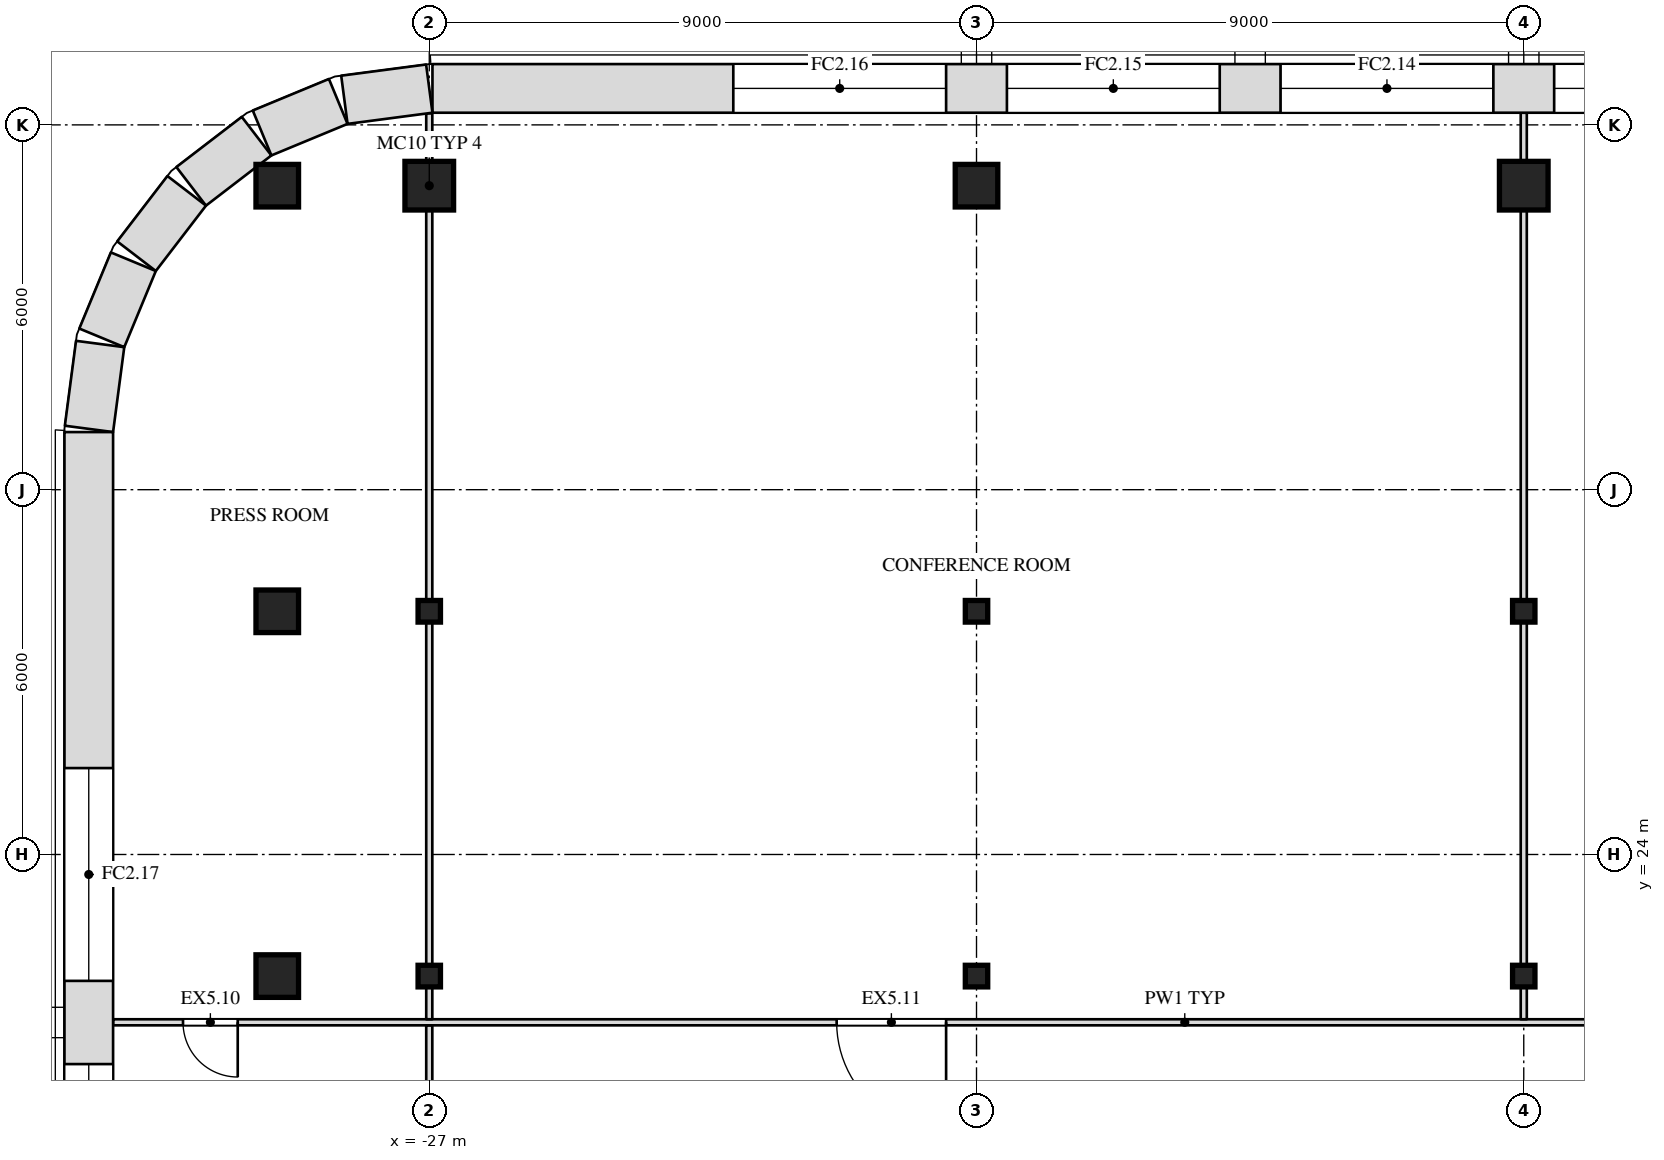
"""IFC4 building model, lengths in metres.
Left out: names, types, materials, properties, quantities, classifications, styles, units other than length and angle.
Written with IfcOpenShell. Run it as: python <this file> out.ifc"""

import sys

from ifc_helpers import new_model, si_unit, direction, frame, frame_2d, origin, origin_2d, place, context, subcontext, project, spatial, rectangle, i_section, extrude, element, fill, save


model = new_model("IFC4")
c1 = context("Model", 3, precision=1e-05, world=origin(), true_north=direction((0.0, 1.0)))
c2 = subcontext(c1, "Body", "Model", "MODEL_VIEW")
j1 = project(units=[si_unit("LENGTHUNIT", "METRE"), si_unit("PLANEANGLEUNIT", "RADIAN")], contexts=[c1])
p1 = place(None, origin())
s1 = spatial("IfcSite", under=j1, at=p1, CompositionType="ELEMENT")
p2 = place(p1, origin())
s2 = spatial("IfcBuilding", under=s1, at=p2, CompositionType="ELEMENT")
p3 = place(p2, frame((0.0, 0.0, 288.5)))
s3 = spatial("IfcBuildingStorey", under=s2, at=p3, CompositionType="ELEMENT", Elevation=288.5)
p4 = place(p3, frame((-29.5, 22.0, 0.0), z_axis=(0.0, 0.0, 1.0), x_axis=(1.0, 0.0, 0.0)))
e1 = element("IfcColumn", 1, at=p4, inside=s3, PredefinedType="COLUMN", context=c2, shape_type="SweptSolid", body=[
    extrude(rectangle(XDim=0.7, YDim=0.7, at=origin_2d()), origin(), (0.0, 0.0, 1.0), 4.0),
])
for number, where, z_axis, x_axis in (
    (2, (-27.0, 22.0, 0.0), (0.0, 0.0, 1.0), (1.0, 0.0, 0.0)),
    (3, (-18.0, 22.0, 0.0), (0.0, 0.0, 1.0), (1.0, 0.0, 0.0)),
    (4, (-9.0, 22.0, 0.0), (0.0, 0.0, 1.0), (1.0, 0.0, 0.0)),
):
    element("IfcColumn", number, at=place(p3, frame(where, z_axis=z_axis, x_axis=x_axis)), inside=s3, PredefinedType="COLUMN", context=c2, shape_type="SweptSolid", body=[
        extrude(i_section(OverallWidth=0.368, OverallDepth=0.356, WebThickness=0.011, FlangeThickness=0.018, at=origin_2d()), origin(), (0.0, 0.0, 1.0), 4.0),
    ])
p5 = place(p3, frame((-29.5, 28.0, 0.0), z_axis=(0.0, 0.0, 1.0), x_axis=(1.0, 0.0, 0.0)))
e5 = element("IfcColumn", 5, at=p5, inside=s3, PredefinedType="COLUMN", context=c2, shape_type="SweptSolid", body=[
    extrude(rectangle(XDim=0.7, YDim=0.7, at=origin_2d()), origin(), (0.0, 0.0, 1.0), 4.0),
])
for number, where, z_axis, x_axis in (
    (6, (-27.0, 28.0, 0.0), (0.0, 0.0, 1.0), (1.0, 0.0, 0.0)),
    (7, (-18.0, 28.0, 0.0), (0.0, 0.0, 1.0), (1.0, 0.0, 0.0)),
    (8, (-9.0, 28.0, 0.0), (0.0, 0.0, 1.0), (1.0, 0.0, 0.0)),
):
    element("IfcColumn", number, at=place(p3, frame(where, z_axis=z_axis, x_axis=x_axis)), inside=s3, PredefinedType="COLUMN", context=c2, shape_type="SweptSolid", body=[
        extrude(i_section(OverallWidth=0.368, OverallDepth=0.356, WebThickness=0.011, FlangeThickness=0.018, at=origin_2d()), origin(), (0.0, 0.0, 1.0), 4.0),
    ])
p6 = place(p3, frame((-29.5, 35.0, 0.0), z_axis=(0.0, 0.0, 1.0), x_axis=(1.0, 0.0, 0.0)))
e9 = element("IfcColumn", 9, at=p6, inside=s3, PredefinedType="COLUMN", context=c2, shape_type="SweptSolid", body=[
    extrude(rectangle(XDim=0.7, YDim=0.7, at=origin_2d()), origin(), (0.0, 0.0, 1.0), 4.0),
])
p7 = place(p3, frame((-27.0, 35.0, 0.0), z_axis=(0.0, 0.0, 1.0), x_axis=(1.0, 0.0, 0.0)))
e10 = element("IfcColumn", 10, at=p7, inside=s3, PredefinedType="COLUMN", context=c2, shape_type="SweptSolid", body=[
    extrude(rectangle(XDim=0.8, YDim=0.8, at=origin_2d()), origin(), (0.0, 0.0, 1.0), 4.0),
])
p8 = place(p3, frame((-18.0, 35.0, 0.0), z_axis=(0.0, 0.0, 1.0), x_axis=(1.0, 0.0, 0.0)))
e11 = element("IfcColumn", 11, at=p8, inside=s3, PredefinedType="COLUMN", context=c2, shape_type="SweptSolid", body=[
    extrude(rectangle(XDim=0.7, YDim=0.7, at=origin_2d()), origin(), (0.0, 0.0, 1.0), 4.0),
])
p9 = place(p3, frame((-9.0, 35.0, 0.0), z_axis=(0.0, 0.0, 1.0), x_axis=(1.0, 0.0, 0.0)))
e12 = element("IfcColumn", 12, at=p9, inside=s3, PredefinedType="COLUMN", context=c2, shape_type="SweptSolid", body=[
    extrude(rectangle(XDim=0.8, YDim=0.8, at=origin_2d()), origin(), (0.0, 0.0, 1.0), 4.0),
])
p10 = place(p3, frame((-27.0, 14.178, 0.0), z_axis=(0.0, 0.0, 1.0), x_axis=(0.0, 1.0, 0.0)))
e13 = element("IfcWall", 13, at=p10, inside=s3, PredefinedType="PARTITIONING", context=c2, shape_type="SweptSolid", body=[
    extrude(rectangle(XDim=7.012, YDim=0.1, at=frame_2d((3.506, 0.0))), origin(), (0.0, 0.0, 1.0), 3.247),
])
p11 = place(p3, frame((-32.2, 21.24, 0.0), z_axis=(0.0, 0.0, 1.0), x_axis=(1.0, 0.0, 0.0)))
e14 = element("IfcWall", 14, at=p11, inside=s3, PredefinedType="PARTITIONING", context=c2, shape_type="SweptSolid", body=[
    extrude(rectangle(XDim=35.25, YDim=0.1, at=frame_2d((17.625, 0.0))), origin(), (0.0, 0.0, 1.0), 3.78),
])
p12 = place(p11, frame((1.15, 0.0, 0.0)))
e15 = element("IfcOpeningElement", 15, at=p12, cuts=e14, PredefinedType="OPENING", context=c2, shape_type="SweptSolid", body=[
    extrude(rectangle(XDim=0.9, YDim=2.1, at=frame_2d((0.45, 1.05))), frame((0.0, 0.062, 0.0), z_axis=(0.0, -1.0, 0.0), x_axis=(1.0, 0.0, 0.0)), (0.0, 0.0, 1.0), 0.124),
])
p13 = place(p11, frame((11.9, 0.0, 0.0)))
e16 = element("IfcOpeningElement", 16, at=p13, cuts=e14, PredefinedType="OPENING", context=c2, shape_type="SweptSolid", body=[
    extrude(rectangle(XDim=1.8, YDim=2.1, at=frame_2d((0.9, 1.05))), frame((0.0, 0.062, 0.0), z_axis=(0.0, -1.0, 0.0), x_axis=(1.0, 0.0, 0.0)), (0.0, 0.0, 1.0), 0.124),
])
p14 = place(p3, frame((-27.0, 21.29, 0.0), z_axis=(0.0, 0.0, 1.0), x_axis=(0.0, 1.0, 0.0)))
e17 = element("IfcWall", 17, at=p14, inside=s3, PredefinedType="PARTITIONING", context=c2, shape_type="SweptSolid", body=[
    extrude(rectangle(XDim=0.532, YDim=0.1, at=frame_2d((0.266, 0.0))), origin(), (0.0, 0.0, 1.0), 3.247),
])
p15 = place(p3, frame((-27.0, 22.178, 0.0), z_axis=(0.0, 0.0, 1.0), x_axis=(0.0, 1.0, 0.0)))
e18 = element("IfcWall", 18, at=p15, inside=s3, PredefinedType="PARTITIONING", context=c2, shape_type="SweptSolid", body=[
    extrude(rectangle(XDim=5.645, YDim=0.1, at=frame_2d((2.822, 0.0))), origin(), (0.0, 0.0, 1.0), 3.247),
])
p16 = place(p3, frame((-27.0, 28.178, 0.0), z_axis=(0.0, 0.0, 1.0), x_axis=(0.0, 1.0, 0.0)))
e19 = element("IfcWall", 19, at=p16, inside=s3, PredefinedType="PARTITIONING", context=c2, shape_type="SweptSolid", body=[
    extrude(rectangle(XDim=6.422, YDim=0.1, at=frame_2d((3.211, 0.0))), origin(), (0.0, 0.0, 1.0), 3.247),
])
p17 = place(p3, frame((-27.0, 35.4, 0.0), z_axis=(0.0, 0.0, 1.0), x_axis=(0.0, 1.0, 0.0)))
e20 = element("IfcWall", 20, at=p17, inside=s3, PredefinedType="PARTITIONING", context=c2, shape_type="SweptSolid", body=[
    extrude(rectangle(XDim=0.79, YDim=0.1, at=frame_2d((0.395, 0.0))), origin(), (0.0, 0.0, 1.0), 3.78),
])
p18 = place(p3, frame((-9.0, 21.29, 0.0), z_axis=(0.0, 0.0, 1.0), x_axis=(0.0, 1.0, 0.0)))
e21 = element("IfcWall", 21, at=p18, inside=s3, PredefinedType="PARTITIONING", context=c2, shape_type="SweptSolid", body=[
    extrude(rectangle(XDim=0.532, YDim=0.1, at=frame_2d((0.266, 0.0))), origin(), (0.0, 0.0, 1.0), 3.247),
])
p19 = place(p3, frame((-9.0, 22.178, 0.0), z_axis=(0.0, 0.0, 1.0), x_axis=(0.0, 1.0, 0.0)))
e22 = element("IfcWall", 22, at=p19, inside=s3, PredefinedType="PARTITIONING", context=c2, shape_type="SweptSolid", body=[
    extrude(rectangle(XDim=5.645, YDim=0.1, at=frame_2d((2.822, 0.0))), origin(), (0.0, 0.0, 1.0), 3.247),
])
p20 = place(p3, frame((-9.0, 28.178, 0.0), z_axis=(0.0, 0.0, 1.0), x_axis=(0.0, 1.0, 0.0)))
e23 = element("IfcWall", 23, at=p20, inside=s3, PredefinedType="PARTITIONING", context=c2, shape_type="SweptSolid", body=[
    extrude(rectangle(XDim=6.422, YDim=0.1, at=frame_2d((3.211, 0.0))), origin(), (0.0, 0.0, 1.0), 3.247),
])
p21 = place(p3, frame((-9.0, 35.4, 0.0), z_axis=(0.0, 0.0, 1.0), x_axis=(0.0, 1.0, 0.0)))
e24 = element("IfcWall", 24, at=p21, inside=s3, PredefinedType="PARTITIONING", context=c2, shape_type="SweptSolid", body=[
    extrude(rectangle(XDim=0.8, YDim=0.1, at=frame_2d((0.4, 0.0))), origin(), (0.0, 0.0, 1.0), 3.78),
])
p22 = place(p3, frame((26.948, 36.6, 0.0), z_axis=(0.0, 0.0, 1.0), x_axis=(-1.0, 0.0, 0.0)))
e25 = element("IfcWall", 25, at=p22, inside=s3, PredefinedType="SOLIDWALL", context=c2, shape_type="SweptSolid", body=[
    extrude(rectangle(XDim=53.895, YDim=0.8, at=frame_2d((26.948, 0.0))), origin(), (0.0, 0.0, 1.0), 3.78),
])
p23 = place(p22, frame((4.948, 0.0, 1.0)))
e26 = element("IfcOpeningElement", 26, at=p23, cuts=e25, PredefinedType="OPENING", context=c2, shape_type="SweptSolid", body=[
    extrude(rectangle(XDim=3.5, YDim=2.5, at=frame_2d((1.75, 1.25))), frame((0.0, 0.412, 0.0), z_axis=(0.0, -1.0, 0.0), x_axis=(1.0, 0.0, 0.0)), (0.0, 0.0, 1.0), 0.824),
])
p24 = place(p22, frame((9.448, 0.0, 1.0)))
e27 = element("IfcOpeningElement", 27, at=p24, cuts=e25, PredefinedType="OPENING", context=c2, shape_type="SweptSolid", body=[
    extrude(rectangle(XDim=3.5, YDim=2.5, at=frame_2d((1.75, 1.25))), frame((0.0, 0.412, 0.0), z_axis=(0.0, -1.0, 0.0), x_axis=(1.0, 0.0, 0.0)), (0.0, 0.0, 1.0), 0.824),
])
p25 = place(p22, frame((13.948, 0.0, 1.0)))
e28 = element("IfcOpeningElement", 28, at=p25, cuts=e25, PredefinedType="OPENING", context=c2, shape_type="SweptSolid", body=[
    extrude(rectangle(XDim=3.5, YDim=2.5, at=frame_2d((1.75, 1.25))), frame((0.0, 0.412, 0.0), z_axis=(0.0, -1.0, 0.0), x_axis=(1.0, 0.0, 0.0)), (0.0, 0.0, 1.0), 0.824),
])
p26 = place(p22, frame((18.448, 0.0, 1.0)))
e29 = element("IfcOpeningElement", 29, at=p26, cuts=e25, PredefinedType="OPENING", context=c2, shape_type="SweptSolid", body=[
    extrude(rectangle(XDim=3.5, YDim=2.5, at=frame_2d((1.75, 1.25))), frame((0.0, 0.412, 0.0), z_axis=(0.0, -1.0, 0.0), x_axis=(1.0, 0.0, 0.0)), (0.0, 0.0, 1.0), 0.824),
])
p27 = place(p22, frame((22.948, 0.0, 1.0)))
e30 = element("IfcOpeningElement", 30, at=p27, cuts=e25, PredefinedType="OPENING", context=c2, shape_type="SweptSolid", body=[
    extrude(rectangle(XDim=3.5, YDim=2.5, at=frame_2d((1.75, 1.25))), frame((0.0, 0.412, 0.0), z_axis=(0.0, -1.0, 0.0), x_axis=(1.0, 0.0, 0.0)), (0.0, 0.0, 1.0), 0.824),
])
p28 = place(p22, frame((27.448, 0.0, 1.0)))
e31 = element("IfcOpeningElement", 31, at=p28, cuts=e25, PredefinedType="OPENING", context=c2, shape_type="SweptSolid", body=[
    extrude(rectangle(XDim=3.5, YDim=2.5, at=frame_2d((1.75, 1.25))), frame((0.0, 0.412, 0.0), z_axis=(0.0, -1.0, 0.0), x_axis=(1.0, 0.0, 0.0)), (0.0, 0.0, 1.0), 0.824),
])
p29 = place(p22, frame((31.948, 0.0, 1.0)))
e32 = element("IfcOpeningElement", 32, at=p29, cuts=e25, PredefinedType="OPENING", context=c2, shape_type="SweptSolid", body=[
    extrude(rectangle(XDim=3.5, YDim=2.5, at=frame_2d((1.75, 1.25))), frame((0.0, 0.412, 0.0), z_axis=(0.0, -1.0, 0.0), x_axis=(1.0, 0.0, 0.0)), (0.0, 0.0, 1.0), 0.824),
])
p30 = place(p22, frame((36.448, 0.0, 1.0)))
e33 = element("IfcOpeningElement", 33, at=p30, cuts=e25, PredefinedType="OPENING", context=c2, shape_type="SweptSolid", body=[
    extrude(rectangle(XDim=3.5, YDim=2.5, at=frame_2d((1.75, 1.25))), frame((0.0, 0.412, 0.0), z_axis=(0.0, -1.0, 0.0), x_axis=(1.0, 0.0, 0.0)), (0.0, 0.0, 1.0), 0.824),
])
p31 = place(p22, frame((40.948, 0.0, 1.0)))
e34 = element("IfcOpeningElement", 34, at=p31, cuts=e25, PredefinedType="OPENING", context=c2, shape_type="SweptSolid", body=[
    extrude(rectangle(XDim=3.5, YDim=2.5, at=frame_2d((1.75, 1.25))), frame((0.0, 0.412, 0.0), z_axis=(0.0, -1.0, 0.0), x_axis=(1.0, 0.0, 0.0)), (0.0, 0.0, 1.0), 0.824),
])
p32 = place(p22, frame((45.448, 0.0, 1.0)))
e35 = element("IfcOpeningElement", 35, at=p32, cuts=e25, PredefinedType="OPENING", context=c2, shape_type="SweptSolid", body=[
    extrude(rectangle(XDim=3.5, YDim=2.5, at=frame_2d((1.75, 1.25))), frame((0.0, 0.412, 0.0), z_axis=(0.0, -1.0, 0.0), x_axis=(1.0, 0.0, 0.0)), (0.0, 0.0, 1.0), 0.824),
])
p33 = place(p3, frame((-27.0, 36.597, 0.0), z_axis=(0.0, 0.0, 1.0), x_axis=(-0.99144603414, -0.130517283865, 0.0)))
e36 = element("IfcWall", 36, at=p33, inside=s3, PredefinedType="SOLIDWALL", context=c2, shape_type="SweptSolid", body=[
    extrude(rectangle(XDim=1.408, YDim=0.8, at=frame_2d((0.704, 0.0))), origin(), (0.0, 0.0, 1.0), 3.78),
])
p34 = place(p3, frame((-28.497, 36.386, 0.0), z_axis=(0.0, 0.0, 1.0), x_axis=(-0.923847774587, -0.38276009378, 0.0)))
e37 = element("IfcWall", 37, at=p34, inside=s3, PredefinedType="SOLIDWALL", context=c2, shape_type="SweptSolid", body=[
    extrude(rectangle(XDim=1.355, YDim=0.8, at=frame_2d((0.678, 0.0))), origin(), (0.0, 0.0, 1.0), 3.78),
])
for number, where, z_axis, x_axis in (
    (38, (-29.84, 35.815, 0.0), (0.0, 0.0, 1.0), (-0.793, -0.609, 0.0)),
    (39, (-30.989, 34.916, 0.0), (0.0, 0.0, 1.0), (-0.609, -0.793, 0.0)),
):
    element("IfcWall", number, at=place(p3, frame(where, z_axis=z_axis, x_axis=x_axis)), inside=s3, PredefinedType="SOLIDWALL", context=c2, shape_type="SweptSolid", body=[
        extrude(rectangle(XDim=1.356, YDim=0.8, at=frame_2d((0.678, 0.0))), origin(), (0.0, 0.0, 1.0), 3.78),
    ])
p35 = place(p3, frame((-31.867, 33.75, 0.0), z_axis=(0.0, 0.0, 1.0), x_axis=(-0.38276009378, -0.923847774587, 0.0)))
e40 = element("IfcWall", 40, at=p35, inside=s3, PredefinedType="SOLIDWALL", context=c2, shape_type="SweptSolid", body=[
    extrude(rectangle(XDim=1.355, YDim=0.8, at=frame_2d((0.678, 0.0))), origin(), (0.0, 0.0, 1.0), 3.78),
])
p36 = place(p3, frame((-32.413, 32.396, 0.0), z_axis=(0.0, 0.0, 1.0), x_axis=(-0.130517283865, -0.99144603414, 0.0)))
e41 = element("IfcWall", 41, at=p36, inside=s3, PredefinedType="SOLIDWALL", context=c2, shape_type="SweptSolid", body=[
    extrude(rectangle(XDim=1.408, YDim=0.8, at=frame_2d((0.704, 0.0))), origin(), (0.0, 0.0, 1.0), 3.78),
])
p37 = place(p3, frame((-32.6, 30.948, 0.0), z_axis=(0.0, 0.0, 1.0), x_axis=(0.0, -1.0, 0.0)))
e42 = element("IfcWall", 42, at=p37, inside=s3, PredefinedType="SOLIDWALL", context=c2, shape_type="SweptSolid", body=[
    extrude(rectangle(XDim=38.895, YDim=0.8, at=frame_2d((19.448, 0.0))), origin(), (0.0, 0.0, 1.0), 3.78),
])
p38 = place(p37, frame((5.526, 0.0, 1.0)))
e43 = element("IfcOpeningElement", 43, at=p38, cuts=e42, PredefinedType="OPENING", context=c2, shape_type="SweptSolid", body=[
    extrude(rectangle(XDim=3.5, YDim=2.5, at=frame_2d((1.75, 1.25))), frame((0.0, 0.412, 0.0), z_axis=(0.0, -1.0, 0.0), x_axis=(1.0, 0.0, 0.0)), (0.0, 0.0, 1.0), 0.824),
])
p39 = place(p37, frame((10.395, 0.0, 1.0)))
e44 = element("IfcOpeningElement", 44, at=p39, cuts=e42, PredefinedType="OPENING", context=c2, shape_type="SweptSolid", body=[
    extrude(rectangle(XDim=3.5, YDim=2.5, at=frame_2d((1.75, 1.25))), frame((0.0, 0.412, 0.0), z_axis=(0.0, -1.0, 0.0), x_axis=(1.0, 0.0, 0.0)), (0.0, 0.0, 1.0), 0.824),
])
p40 = place(p37, frame((15.263, 0.0, 1.0)))
e45 = element("IfcOpeningElement", 45, at=p40, cuts=e42, PredefinedType="OPENING", context=c2, shape_type="SweptSolid", body=[
    extrude(rectangle(XDim=3.5, YDim=2.5, at=frame_2d((1.75, 1.25))), frame((0.0, 0.412, 0.0), z_axis=(0.0, -1.0, 0.0), x_axis=(1.0, 0.0, 0.0)), (0.0, 0.0, 1.0), 0.824),
])
p41 = place(p37, frame((20.132, 0.0, 1.0)))
e46 = element("IfcOpeningElement", 46, at=p41, cuts=e42, PredefinedType="OPENING", context=c2, shape_type="SweptSolid", body=[
    extrude(rectangle(XDim=3.5, YDim=2.5, at=frame_2d((1.75, 1.25))), frame((0.0, 0.412, 0.0), z_axis=(0.0, -1.0, 0.0), x_axis=(1.0, 0.0, 0.0)), (0.0, 0.0, 1.0), 0.824),
])
p42 = place(p37, frame((25.0, 0.0, 1.0)))
e47 = element("IfcOpeningElement", 47, at=p42, cuts=e42, PredefinedType="OPENING", context=c2, shape_type="SweptSolid", body=[
    extrude(rectangle(XDim=3.5, YDim=2.5, at=frame_2d((1.75, 1.25))), frame((0.0, 0.412, 0.0), z_axis=(0.0, -1.0, 0.0), x_axis=(1.0, 0.0, 0.0)), (0.0, 0.0, 1.0), 0.824),
])
p43 = place(p37, frame((29.869, 0.0, 1.0)))
e48 = element("IfcOpeningElement", 48, at=p43, cuts=e42, PredefinedType="OPENING", context=c2, shape_type="SweptSolid", body=[
    extrude(rectangle(XDim=3.5, YDim=2.5, at=frame_2d((1.75, 1.25))), frame((0.0, 0.412, 0.0), z_axis=(0.0, -1.0, 0.0), x_axis=(1.0, 0.0, 0.0)), (0.0, 0.0, 1.0), 0.824),
])
p44 = place(p12, origin())
e49 = element("IfcDoor", 49, at=p44, inside=s3, OperationType="SINGLE_SWING_LEFT", PredefinedType="DOOR", context=c2, shape_type="SweptSolid", body=[
    extrude(rectangle(XDim=0.9, YDim=2.1, at=frame_2d((0.45, 1.05))), frame((0.0, 0.025, 0.0), z_axis=(0.0, -1.0, 0.0), x_axis=(1.0, 0.0, 0.0)), (0.0, 0.0, 1.0), 0.05),
])
fill(e15, e49)
p45 = place(p13, origin())
e50 = element("IfcDoor", 50, at=p45, inside=s3, OperationType="DOUBLE_DOOR_SINGLE_SWING", PredefinedType="DOOR", context=c2, shape_type="SweptSolid", body=[
    extrude(rectangle(XDim=1.8, YDim=2.1, at=frame_2d((0.9, 1.05))), frame((0.0, 0.025, 0.0), z_axis=(0.0, -1.0, 0.0), x_axis=(1.0, 0.0, 0.0)), (0.0, 0.0, 1.0), 0.05),
])
fill(e16, e50)
p46 = place(p29, origin())
e51 = element("IfcWindow", 51, at=p46, inside=s3, PartitioningType="SINGLE_PANEL", PredefinedType="WINDOW", context=c2, shape_type="SweptSolid", body=[
    extrude(rectangle(XDim=3.5, YDim=2.5, at=frame_2d((1.75, 1.25))), frame((0.0, 0.03, 0.0), z_axis=(0.0, -1.0, 0.0), x_axis=(1.0, 0.0, 0.0)), (0.0, 0.0, 1.0), 0.06),
])
fill(e32, e51)
p47 = place(p30, origin())
e52 = element("IfcWindow", 52, at=p47, inside=s3, PartitioningType="SINGLE_PANEL", PredefinedType="WINDOW", context=c2, shape_type="SweptSolid", body=[
    extrude(rectangle(XDim=3.5, YDim=2.5, at=frame_2d((1.75, 1.25))), frame((0.0, 0.03, 0.0), z_axis=(0.0, -1.0, 0.0), x_axis=(1.0, 0.0, 0.0)), (0.0, 0.0, 1.0), 0.06),
])
fill(e33, e52)
p48 = place(p31, origin())
e53 = element("IfcWindow", 53, at=p48, inside=s3, PartitioningType="SINGLE_PANEL", PredefinedType="WINDOW", context=c2, shape_type="SweptSolid", body=[
    extrude(rectangle(XDim=3.5, YDim=2.5, at=frame_2d((1.75, 1.25))), frame((0.0, 0.03, 0.0), z_axis=(0.0, -1.0, 0.0), x_axis=(1.0, 0.0, 0.0)), (0.0, 0.0, 1.0), 0.06),
])
fill(e34, e53)
p49 = place(p32, origin())
e54 = element("IfcWindow", 54, at=p49, inside=s3, PartitioningType="SINGLE_PANEL", PredefinedType="WINDOW", context=c2, shape_type="SweptSolid", body=[
    extrude(rectangle(XDim=3.5, YDim=2.5, at=frame_2d((1.75, 1.25))), frame((0.0, 0.03, 0.0), z_axis=(0.0, -1.0, 0.0), x_axis=(1.0, 0.0, 0.0)), (0.0, 0.0, 1.0), 0.06),
])
fill(e35, e54)
p50 = place(p38, origin())
e55 = element("IfcWindow", 55, at=p50, inside=s3, PartitioningType="SINGLE_PANEL", PredefinedType="WINDOW", context=c2, shape_type="SweptSolid", body=[
    extrude(rectangle(XDim=3.5, YDim=2.5, at=frame_2d((1.75, 1.25))), frame((0.0, 0.03, 0.0), z_axis=(0.0, -1.0, 0.0), x_axis=(1.0, 0.0, 0.0)), (0.0, 0.0, 1.0), 0.06),
])
fill(e43, e55)
p51 = place(p39, origin())
e56 = element("IfcWindow", 56, at=p51, inside=s3, PartitioningType="SINGLE_PANEL", PredefinedType="WINDOW", context=c2, shape_type="SweptSolid", body=[
    extrude(rectangle(XDim=3.5, YDim=2.5, at=frame_2d((1.75, 1.25))), frame((0.0, 0.03, 0.0), z_axis=(0.0, -1.0, 0.0), x_axis=(1.0, 0.0, 0.0)), (0.0, 0.0, 1.0), 0.06),
])
fill(e44, e56)
save(model, sys.argv[1])
